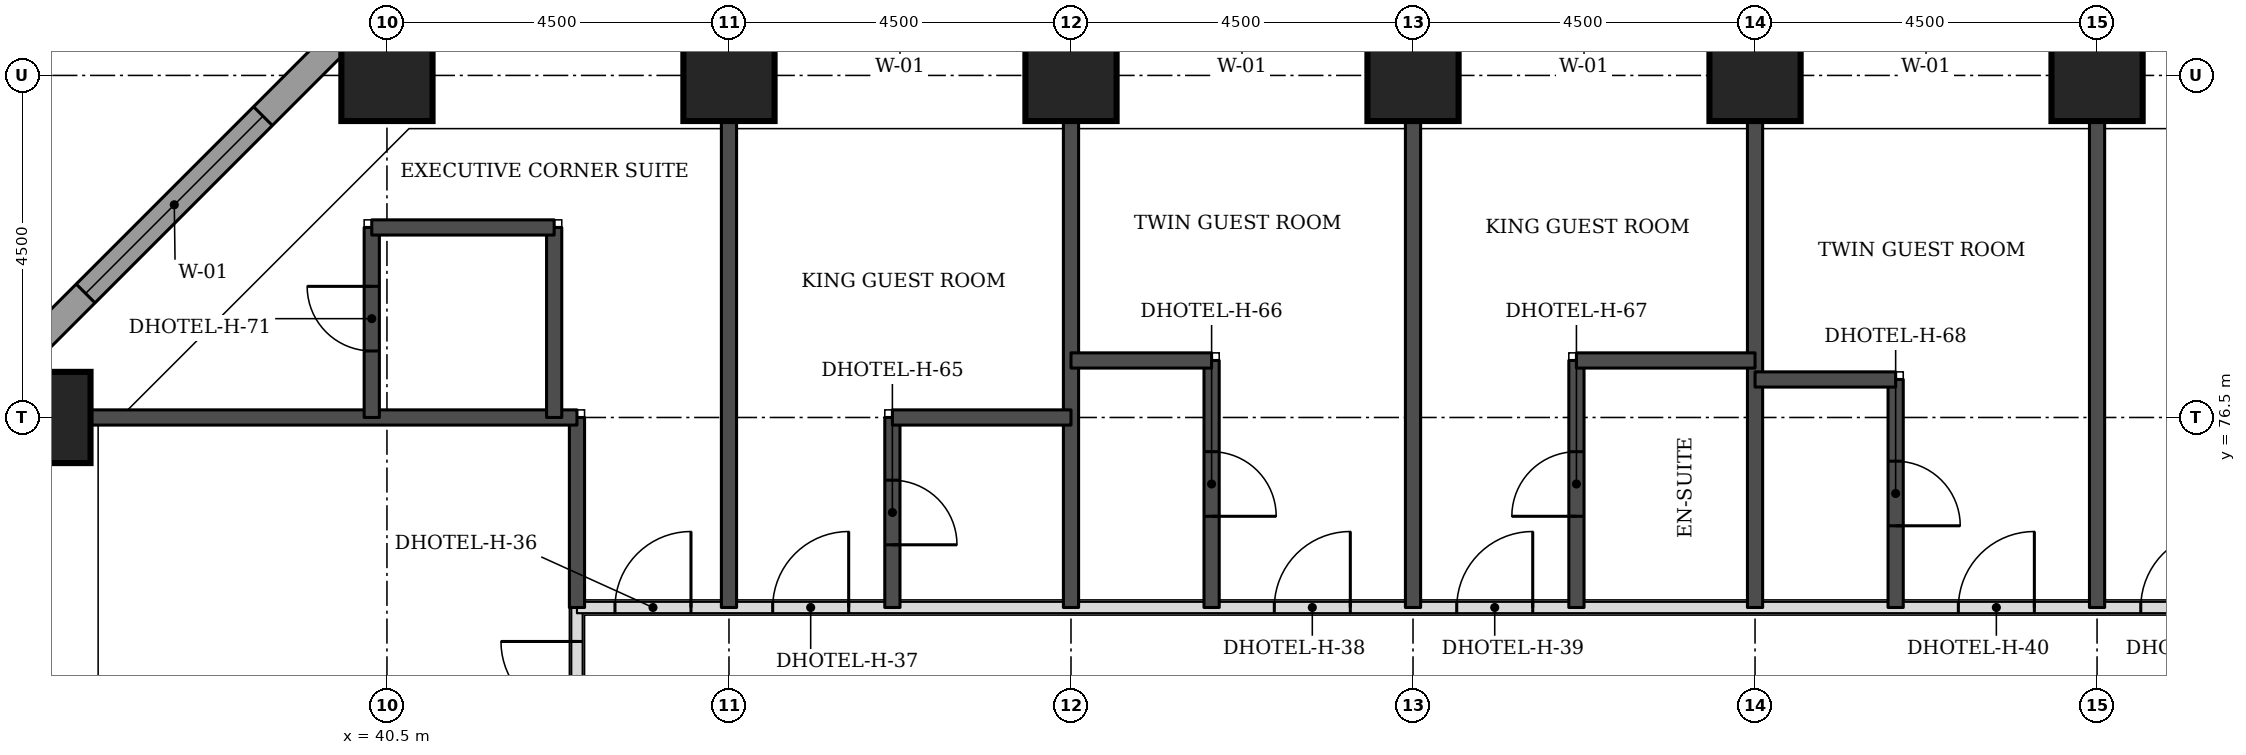
"""IFC4 building model, lengths in metres.
Left out: names, types, materials, properties, quantities, classifications, styles, units other than length and angle.
Written with IfcOpenShell. Run it as: python <this file> out.ifc"""

import sys

from ifc_helpers import new_model, si_unit, direction, frame, frame_2d, origin, origin_2d, place, context, subcontext, project, spatial, rectangle, extrude, element, fill, save


model = new_model("IFC4")
c1 = context("Model", 3, precision=1e-05, world=origin(), true_north=direction((0.0, 1.0)))
c2 = subcontext(c1, "Body", "Model", "MODEL_VIEW")
j1 = project(units=[si_unit("LENGTHUNIT", "METRE"), si_unit("PLANEANGLEUNIT", "RADIAN")], contexts=[c1])
p1 = place(None, origin())
s1 = spatial("IfcSite", under=j1, at=p1, CompositionType="ELEMENT")
p2 = place(p1, origin())
s2 = spatial("IfcBuilding", under=s1, at=p2, CompositionType="ELEMENT")
p3 = place(p2, frame((0.0, 0.0, 46.2)))
s3 = spatial("IfcBuildingStorey", under=s2, at=p3, CompositionType="ELEMENT", Elevation=46.2)
for number, where, z_axis, x_axis in (
    (1, (36.0, 76.5, 0.0), (0.0, 0.0, 1.0), (1.0, 0.0, 0.0)),
    (2, (40.5, 81.0, 0.0), (0.0, 0.0, 1.0), (1.0, 0.0, 0.0)),
    (3, (45.0, 81.0, 0.0), (0.0, 0.0, 1.0), (1.0, 0.0, 0.0)),
    (4, (49.5, 81.0, 0.0), (0.0, 0.0, 1.0), (1.0, 0.0, 0.0)),
    (5, (54.0, 81.0, 0.0), (0.0, 0.0, 1.0), (1.0, 0.0, 0.0)),
    (6, (58.5, 81.0, 0.0), (0.0, 0.0, 1.0), (1.0, 0.0, 0.0)),
    (7, (63.0, 81.0, 0.0), (0.0, 0.0, 1.0), (1.0, 0.0, 0.0)),
):
    element("IfcColumn", number, at=place(p3, frame(where, z_axis=z_axis, x_axis=x_axis)), inside=s3, PredefinedType="COLUMN", context=c2, shape_type="SweptSolid", body=[
        extrude(rectangle(XDim=1.2, YDim=1.2, at=origin_2d()), origin(), (0.0, 0.0, 1.0), 3.3),
    ])
p4 = place(p3, frame((40.23, 81.826, 0.0), z_axis=(0.0, 0.0, 1.0), x_axis=(-0.707106781187, -0.707106781187, 0.0)))
e8 = element("IfcWall", 8, at=p4, inside=s3, PredefinedType="STANDARD", context=c2, shape_type="SweptSolid", body=[
    extrude(rectangle(XDim=7.151, YDim=0.35, at=frame_2d((3.576, 0.0))), origin(), (0.0, 0.0, 1.0), 3.055),
])
p5 = place(p4, frame((1.926, 0.0, 0.8)))
e9 = element("IfcOpeningElement", 9, at=p5, cuts=e8, PredefinedType="OPENING", context=c2, shape_type="SweptSolid", body=[
    extrude(rectangle(XDim=3.3, YDim=1.5, at=frame_2d((1.65, 0.75))), frame((0.0, 0.185, 0.0), z_axis=(0.0, -1.0, 0.0), x_axis=(1.0, 0.0, 0.0)), (0.0, 0.0, 1.0), 0.37),
])
p6 = place(p3, frame((43.0, 56.0, 0.0), z_axis=(0.0, 0.0, 1.0), x_axis=(0.0, 1.0, 0.0)))
e10 = element("IfcWall", 10, at=p6, inside=s3, PredefinedType="PARTITIONING", context=c2, shape_type="SweptSolid", body=[
    extrude(rectangle(XDim=18.0, YDim=0.15, at=frame_2d((9.0, 0.0))), origin(), (0.0, 0.0, 1.0), 3.08),
])
p7 = place(p6, frame((7.575, 0.0, 0.0)))
e11 = element("IfcOpeningElement", 11, at=p7, cuts=e10, PredefinedType="OPENING", context=c2, shape_type="SweptSolid", body=[
    extrude(rectangle(XDim=1.0, YDim=2.1, at=frame_2d((0.5, 1.05))), frame((0.0, 0.085, 0.0), z_axis=(0.0, -1.0, 0.0), x_axis=(1.0, 0.0, 0.0)), (0.0, 0.0, 1.0), 0.17),
])
p8 = place(p6, frame((16.553, 0.0, 0.0)))
e12 = element("IfcOpeningElement", 12, at=p8, cuts=e10, PredefinedType="OPENING", context=c2, shape_type="SweptSolid", body=[
    extrude(rectangle(XDim=1.0, YDim=2.1, at=frame_2d((0.5, 1.05))), frame((0.0, 0.085, 0.0), z_axis=(0.0, -1.0, 0.0), x_axis=(1.0, 0.0, 0.0)), (0.0, 0.0, 1.0), 0.17),
])
p9 = place(p6, frame((3.05, 0.0, 0.0)))
e13 = element("IfcOpeningElement", 13, at=p9, cuts=e10, PredefinedType="OPENING", context=c2, shape_type="SweptSolid", body=[
    extrude(rectangle(XDim=0.9, YDim=2.1, at=frame_2d((0.45, 1.05))), frame((0.0, 0.085, 0.0), z_axis=(0.0, -1.0, 0.0), x_axis=(1.0, 0.0, 0.0)), (0.0, 0.0, 1.0), 0.17),
])
p10 = place(p3, frame((43.0, 74.0, 0.0), z_axis=(0.0, 0.0, 1.0), x_axis=(1.0, 0.0, 0.0)))
e14 = element("IfcWall", 14, at=p10, inside=s3, PredefinedType="PARTITIONING", context=c2, shape_type="SweptSolid", body=[
    extrude(rectangle(XDim=26.5, YDim=0.15, at=frame_2d((13.25, 0.0))), origin(), (0.0, 0.0, 1.0), 3.08),
])
p11 = place(p10, frame((2.575, 0.0, 0.0)))
e15 = element("IfcOpeningElement", 15, at=p11, cuts=e14, PredefinedType="OPENING", context=c2, shape_type="SweptSolid", body=[
    extrude(rectangle(XDim=1.0, YDim=2.1, at=frame_2d((0.5, 1.05))), frame((0.0, 0.085, 0.0), z_axis=(0.0, -1.0, 0.0), x_axis=(1.0, 0.0, 0.0)), (0.0, 0.0, 1.0), 0.17),
])
p12 = place(p10, frame((9.175, 0.0, 0.0)))
e16 = element("IfcOpeningElement", 16, at=p12, cuts=e14, PredefinedType="OPENING", context=c2, shape_type="SweptSolid", body=[
    extrude(rectangle(XDim=1.0, YDim=2.1, at=frame_2d((0.5, 1.05))), frame((0.0, 0.085, 0.0), z_axis=(0.0, -1.0, 0.0), x_axis=(1.0, 0.0, 0.0)), (0.0, 0.0, 1.0), 0.17),
])
p13 = place(p10, frame((11.575, 0.0, 0.0)))
e17 = element("IfcOpeningElement", 17, at=p13, cuts=e14, PredefinedType="OPENING", context=c2, shape_type="SweptSolid", body=[
    extrude(rectangle(XDim=1.0, YDim=2.1, at=frame_2d((0.5, 1.05))), frame((0.0, 0.085, 0.0), z_axis=(0.0, -1.0, 0.0), x_axis=(1.0, 0.0, 0.0)), (0.0, 0.0, 1.0), 0.17),
])
p14 = place(p10, frame((18.175, 0.0, 0.0)))
e18 = element("IfcOpeningElement", 18, at=p14, cuts=e14, PredefinedType="OPENING", context=c2, shape_type="SweptSolid", body=[
    extrude(rectangle(XDim=1.0, YDim=2.1, at=frame_2d((0.5, 1.05))), frame((0.0, 0.085, 0.0), z_axis=(0.0, -1.0, 0.0), x_axis=(1.0, 0.0, 0.0)), (0.0, 0.0, 1.0), 0.17),
])
p15 = place(p10, frame((20.575, 0.0, 0.0)))
e19 = element("IfcOpeningElement", 19, at=p15, cuts=e14, PredefinedType="OPENING", context=c2, shape_type="SweptSolid", body=[
    extrude(rectangle(XDim=1.0, YDim=2.1, at=frame_2d((0.5, 1.05))), frame((0.0, 0.085, 0.0), z_axis=(0.0, -1.0, 0.0), x_axis=(1.0, 0.0, 0.0)), (0.0, 0.0, 1.0), 0.17),
])
p16 = place(p10, frame((0.5, 0.0, 0.0)))
e20 = element("IfcOpeningElement", 20, at=p16, cuts=e14, PredefinedType="OPENING", context=c2, shape_type="SweptSolid", body=[
    extrude(rectangle(XDim=1.0, YDim=2.1, at=frame_2d((0.5, 1.05))), frame((0.0, 0.085, 0.0), z_axis=(0.0, -1.0, 0.0), x_axis=(1.0, 0.0, 0.0)), (0.0, 0.0, 1.0), 0.17),
])
p17 = place(p10, frame((25.0, 0.0, 0.0)))
e21 = element("IfcOpeningElement", 21, at=p17, cuts=e14, PredefinedType="OPENING", context=c2, shape_type="SweptSolid", body=[
    extrude(rectangle(XDim=1.0, YDim=2.1, at=frame_2d((0.5, 1.05))), frame((0.0, 0.085, 0.0), z_axis=(0.0, -1.0, 0.0), x_axis=(1.0, 0.0, 0.0)), (0.0, 0.0, 1.0), 0.17),
])
p18 = place(p3, frame((43.0, 74.0, 0.0), z_axis=(0.0, 0.0, 1.0), x_axis=(0.0, 1.0, 0.0)))
e22 = element("IfcWall", 22, at=p18, inside=s3, PredefinedType="SOLIDWALL", context=c2, shape_type="SweptSolid", body=[
    extrude(rectangle(XDim=2.5, YDim=0.2, at=frame_2d((1.25, 0.0))), origin(), (0.0, 0.0, 1.0), 3.08),
])
p19 = place(p3, frame((45.0, 74.0, 0.0), z_axis=(0.0, 0.0, 1.0), x_axis=(0.0, 1.0, 0.0)))
e23 = element("IfcWall", 23, at=p19, inside=s3, PredefinedType="SOLIDWALL", context=c2, shape_type="SweptSolid", body=[
    extrude(rectangle(XDim=6.4, YDim=0.2, at=frame_2d((3.2, 0.0))), origin(), (0.0, 0.0, 1.0), 3.08),
])
p20 = place(p3, frame((47.15, 74.0, 0.0), z_axis=(0.0, 0.0, 1.0), x_axis=(0.0, 1.0, 0.0)))
e24 = element("IfcWall", 24, at=p20, inside=s3, PredefinedType="SOLIDWALL", context=c2, shape_type="SweptSolid", body=[
    extrude(rectangle(XDim=2.5, YDim=0.2, at=frame_2d((1.25, 0.0))), origin(), (0.0, 0.0, 1.0), 3.08),
])
p21 = place(p20, frame((0.825, 0.0, 0.0)))
e25 = element("IfcOpeningElement", 25, at=p21, cuts=e24, PredefinedType="OPENING", context=c2, shape_type="SweptSolid", body=[
    extrude(rectangle(XDim=0.85, YDim=2.1, at=frame_2d((0.425, 1.05))), frame((0.0, 0.11, 0.0), z_axis=(0.0, -1.0, 0.0), x_axis=(1.0, 0.0, 0.0)), (0.0, 0.0, 1.0), 0.22),
])
p22 = place(p3, frame((49.5, 74.0, 0.0), z_axis=(0.0, 0.0, 1.0), x_axis=(0.0, 1.0, 0.0)))
e26 = element("IfcWall", 26, at=p22, inside=s3, PredefinedType="SOLIDWALL", context=c2, shape_type="SweptSolid", body=[
    extrude(rectangle(XDim=6.4, YDim=0.2, at=frame_2d((3.2, 0.0))), origin(), (0.0, 0.0, 1.0), 3.08),
])
p23 = place(p3, frame((51.35, 74.0, 0.0), z_axis=(0.0, 0.0, 1.0), x_axis=(0.0, 1.0, 0.0)))
e27 = element("IfcWall", 27, at=p23, inside=s3, PredefinedType="SOLIDWALL", context=c2, shape_type="SweptSolid", body=[
    extrude(rectangle(XDim=3.25, YDim=0.2, at=frame_2d((1.625, 0.0))), origin(), (0.0, 0.0, 1.0), 3.08),
])
p24 = place(p23, frame((1.2, 0.0, 0.0)))
e28 = element("IfcOpeningElement", 28, at=p24, cuts=e27, PredefinedType="OPENING", context=c2, shape_type="SweptSolid", body=[
    extrude(rectangle(XDim=0.85, YDim=2.1, at=frame_2d((0.425, 1.05))), frame((0.0, 0.11, 0.0), z_axis=(0.0, -1.0, 0.0), x_axis=(1.0, 0.0, 0.0)), (0.0, 0.0, 1.0), 0.22),
])
p25 = place(p3, frame((54.0, 74.0, 0.0), z_axis=(0.0, 0.0, 1.0), x_axis=(0.0, 1.0, 0.0)))
e29 = element("IfcWall", 29, at=p25, inside=s3, PredefinedType="SOLIDWALL", context=c2, shape_type="SweptSolid", body=[
    extrude(rectangle(XDim=6.4, YDim=0.2, at=frame_2d((3.2, 0.0))), origin(), (0.0, 0.0, 1.0), 3.08),
])
p26 = place(p3, frame((56.15, 74.0, 0.0), z_axis=(0.0, 0.0, 1.0), x_axis=(0.0, 1.0, 0.0)))
e30 = element("IfcWall", 30, at=p26, inside=s3, PredefinedType="SOLIDWALL", context=c2, shape_type="SweptSolid", body=[
    extrude(rectangle(XDim=3.25, YDim=0.2, at=frame_2d((1.625, 0.0))), origin(), (0.0, 0.0, 1.0), 3.08),
])
p27 = place(p26, frame((1.2, 0.0, 0.0)))
e31 = element("IfcOpeningElement", 31, at=p27, cuts=e30, PredefinedType="OPENING", context=c2, shape_type="SweptSolid", body=[
    extrude(rectangle(XDim=0.85, YDim=2.1, at=frame_2d((0.425, 1.05))), frame((0.0, 0.11, 0.0), z_axis=(0.0, -1.0, 0.0), x_axis=(1.0, 0.0, 0.0)), (0.0, 0.0, 1.0), 0.22),
])
p28 = place(p3, frame((58.5, 74.0, 0.0), z_axis=(0.0, 0.0, 1.0), x_axis=(0.0, 1.0, 0.0)))
e32 = element("IfcWall", 32, at=p28, inside=s3, PredefinedType="SOLIDWALL", context=c2, shape_type="SweptSolid", body=[
    extrude(rectangle(XDim=6.4, YDim=0.2, at=frame_2d((3.2, 0.0))), origin(), (0.0, 0.0, 1.0), 3.08),
])
p29 = place(p3, frame((60.35, 74.0, 0.0), z_axis=(0.0, 0.0, 1.0), x_axis=(0.0, 1.0, 0.0)))
e33 = element("IfcWall", 33, at=p29, inside=s3, PredefinedType="SOLIDWALL", context=c2, shape_type="SweptSolid", body=[
    extrude(rectangle(XDim=3.0, YDim=0.2, at=frame_2d((1.5, 0.0))), origin(), (0.0, 0.0, 1.0), 3.08),
])
p30 = place(p29, frame((1.075, 0.0, 0.0)))
e34 = element("IfcOpeningElement", 34, at=p30, cuts=e33, PredefinedType="OPENING", context=c2, shape_type="SweptSolid", body=[
    extrude(rectangle(XDim=0.85, YDim=2.1, at=frame_2d((0.425, 1.05))), frame((0.0, 0.11, 0.0), z_axis=(0.0, -1.0, 0.0), x_axis=(1.0, 0.0, 0.0)), (0.0, 0.0, 1.0), 0.22),
])
for number, where, z_axis, x_axis in (
    (35, (63.0, 74.0, 0.0), (0.0, 0.0, 1.0), (0.0, 1.0, 0.0)),
    (36, (36.6, 76.5, 0.0), (0.0, 0.0, 1.0), (1.0, 0.0, 0.0)),
):
    element("IfcWall", number, at=place(p3, frame(where, z_axis=z_axis, x_axis=x_axis)), inside=s3, PredefinedType="SOLIDWALL", context=c2, shape_type="SweptSolid", body=[
        extrude(rectangle(XDim=6.4, YDim=0.2, at=frame_2d((3.2, 0.0))), origin(), (0.0, 0.0, 1.0), 3.08),
    ])
p31 = place(p3, frame((40.3, 76.5, 0.0), z_axis=(0.0, 0.0, 1.0), x_axis=(0.0, 1.0, 0.0)))
e37 = element("IfcWall", 37, at=p31, inside=s3, PredefinedType="SOLIDWALL", context=c2, shape_type="SweptSolid", body=[
    extrude(rectangle(XDim=2.5, YDim=0.2, at=frame_2d((1.25, 0.0))), origin(), (0.0, 0.0, 1.0), 3.08),
])
p32 = place(p31, frame((0.875, 0.0, 0.0)))
e38 = element("IfcOpeningElement", 38, at=p32, cuts=e37, PredefinedType="OPENING", context=c2, shape_type="SweptSolid", body=[
    extrude(rectangle(XDim=0.85, YDim=2.1, at=frame_2d((0.425, 1.05))), frame((0.0, 0.11, 0.0), z_axis=(0.0, -1.0, 0.0), x_axis=(1.0, 0.0, 0.0)), (0.0, 0.0, 1.0), 0.22),
])
p33 = place(p3, frame((42.7, 76.5, 0.0), z_axis=(0.0, 0.0, 1.0), x_axis=(0.0, 1.0, 0.0)))
e39 = element("IfcWall", 39, at=p33, inside=s3, PredefinedType="SOLIDWALL", context=c2, shape_type="SweptSolid", body=[
    extrude(rectangle(XDim=2.5, YDim=0.2, at=frame_2d((1.25, 0.0))), origin(), (0.0, 0.0, 1.0), 3.08),
])
p34 = place(p3, frame((47.15, 76.5, 0.0), z_axis=(0.0, 0.0, 1.0), x_axis=(1.0, 0.0, 0.0)))
e40 = element("IfcWall", 40, at=p34, inside=s3, PredefinedType="SOLIDWALL", context=c2, shape_type="SweptSolid", body=[
    extrude(rectangle(XDim=2.35, YDim=0.2, at=frame_2d((1.175, 0.0))), origin(), (0.0, 0.0, 1.0), 3.08),
])
for number, where, z_axis, x_axis in (
    (41, (58.5, 77.0, 0.0), (0.0, 0.0, 1.0), (1.0, 0.0, 0.0)),
    (42, (49.5, 77.25, 0.0), (0.0, 0.0, 1.0), (1.0, 0.0, 0.0)),
):
    element("IfcWall", number, at=place(p3, frame(where, z_axis=z_axis, x_axis=x_axis)), inside=s3, PredefinedType="SOLIDWALL", context=c2, shape_type="SweptSolid", body=[
        extrude(rectangle(XDim=1.85, YDim=0.2, at=frame_2d((0.925, 0.0))), origin(), (0.0, 0.0, 1.0), 3.08),
    ])
p35 = place(p3, frame((56.15, 77.25, 0.0), z_axis=(0.0, 0.0, 1.0), x_axis=(1.0, 0.0, 0.0)))
e43 = element("IfcWall", 43, at=p35, inside=s3, PredefinedType="SOLIDWALL", context=c2, shape_type="SweptSolid", body=[
    extrude(rectangle(XDim=2.35, YDim=0.2, at=frame_2d((1.175, 0.0))), origin(), (0.0, 0.0, 1.0), 3.08),
])
p36 = place(p3, frame((40.3, 79.0, 0.0), z_axis=(0.0, 0.0, 1.0), x_axis=(1.0, 0.0, 0.0)))
e44 = element("IfcWall", 44, at=p36, inside=s3, PredefinedType="SOLIDWALL", context=c2, shape_type="SweptSolid", body=[
    extrude(rectangle(XDim=2.4, YDim=0.2, at=frame_2d((1.2, 0.0))), origin(), (0.0, 0.0, 1.0), 3.08),
])
p37 = place(p5, origin())
e45 = element("IfcWindow", 45, at=p37, inside=s3, PartitioningType="SINGLE_PANEL", PredefinedType="WINDOW", context=c2, shape_type="SweptSolid", body=[
    extrude(rectangle(XDim=3.3, YDim=1.5, at=frame_2d((1.65, 0.75))), frame((0.0, 0.085, 0.0), z_axis=(0.0, -1.0, 0.0), x_axis=(1.0, 0.0, 0.0)), (0.0, 0.0, 1.0), 0.06),
])
fill(e9, e45)
p38 = place(p8, origin())
e46 = element("IfcDoor", 46, at=p38, inside=s3, OperationType="SINGLE_SWING_RIGHT", PredefinedType="DOOR", context=c2, shape_type="SweptSolid", body=[
    extrude(rectangle(XDim=1.0, YDim=2.1, at=frame_2d((0.5, 1.05))), frame((0.0, 0.025, 0.0), z_axis=(0.0, -1.0, 0.0), x_axis=(1.0, 0.0, 0.0)), (0.0, 0.0, 1.0), 0.05),
])
fill(e12, e46)
p39 = place(p11, origin())
e47 = element("IfcDoor", 47, at=p39, inside=s3, OperationType="SINGLE_SWING_RIGHT", PredefinedType="DOOR", context=c2, shape_type="SweptSolid", body=[
    extrude(rectangle(XDim=1.0, YDim=2.1, at=frame_2d((0.5, 1.05))), frame((0.0, 0.025, 0.0), z_axis=(0.0, -1.0, 0.0), x_axis=(1.0, 0.0, 0.0)), (0.0, 0.0, 1.0), 0.05),
])
fill(e15, e47)
p40 = place(p21, frame((0.85, 0.0, 0.0), z_axis=(0.0, 0.0, 1.0), x_axis=(-1.0, 0.0, 0.0)))
e48 = element("IfcDoor", 48, at=p40, inside=s3, OperationType="SINGLE_SWING_RIGHT", PredefinedType="DOOR", context=c2, shape_type="SweptSolid", body=[
    extrude(rectangle(XDim=0.85, YDim=2.1, at=frame_2d((0.425, 1.05))), frame((0.0, 0.025, 0.0), z_axis=(0.0, -1.0, 0.0), x_axis=(1.0, 0.0, 0.0)), (0.0, 0.0, 1.0), 0.05),
])
fill(e25, e48)
p41 = place(p12, origin())
e49 = element("IfcDoor", 49, at=p41, inside=s3, OperationType="SINGLE_SWING_RIGHT", PredefinedType="DOOR", context=c2, shape_type="SweptSolid", body=[
    extrude(rectangle(XDim=1.0, YDim=2.1, at=frame_2d((0.5, 1.05))), frame((0.0, 0.025, 0.0), z_axis=(0.0, -1.0, 0.0), x_axis=(1.0, 0.0, 0.0)), (0.0, 0.0, 1.0), 0.05),
])
fill(e16, e49)
p42 = place(p24, frame((0.85, 0.0, 0.0), z_axis=(0.0, 0.0, 1.0), x_axis=(-1.0, 0.0, 0.0)))
e50 = element("IfcDoor", 50, at=p42, inside=s3, OperationType="SINGLE_SWING_RIGHT", PredefinedType="DOOR", context=c2, shape_type="SweptSolid", body=[
    extrude(rectangle(XDim=0.85, YDim=2.1, at=frame_2d((0.425, 1.05))), frame((0.0, 0.025, 0.0), z_axis=(0.0, -1.0, 0.0), x_axis=(1.0, 0.0, 0.0)), (0.0, 0.0, 1.0), 0.05),
])
fill(e28, e50)
p43 = place(p13, origin())
e51 = element("IfcDoor", 51, at=p43, inside=s3, OperationType="SINGLE_SWING_RIGHT", PredefinedType="DOOR", context=c2, shape_type="SweptSolid", body=[
    extrude(rectangle(XDim=1.0, YDim=2.1, at=frame_2d((0.5, 1.05))), frame((0.0, 0.025, 0.0), z_axis=(0.0, -1.0, 0.0), x_axis=(1.0, 0.0, 0.0)), (0.0, 0.0, 1.0), 0.05),
])
fill(e17, e51)
p44 = place(p27, origin())
e52 = element("IfcDoor", 52, at=p44, inside=s3, OperationType="SINGLE_SWING_LEFT", PredefinedType="DOOR", context=c2, shape_type="SweptSolid", body=[
    extrude(rectangle(XDim=0.85, YDim=2.1, at=frame_2d((0.425, 1.05))), frame((0.0, 0.025, 0.0), z_axis=(0.0, -1.0, 0.0), x_axis=(1.0, 0.0, 0.0)), (0.0, 0.0, 1.0), 0.05),
])
fill(e31, e52)
p45 = place(p14, origin())
e53 = element("IfcDoor", 53, at=p45, inside=s3, OperationType="SINGLE_SWING_RIGHT", PredefinedType="DOOR", context=c2, shape_type="SweptSolid", body=[
    extrude(rectangle(XDim=1.0, YDim=2.1, at=frame_2d((0.5, 1.05))), frame((0.0, 0.025, 0.0), z_axis=(0.0, -1.0, 0.0), x_axis=(1.0, 0.0, 0.0)), (0.0, 0.0, 1.0), 0.05),
])
fill(e18, e53)
p46 = place(p30, frame((0.85, 0.0, 0.0), z_axis=(0.0, 0.0, 1.0), x_axis=(-1.0, 0.0, 0.0)))
e54 = element("IfcDoor", 54, at=p46, inside=s3, OperationType="SINGLE_SWING_RIGHT", PredefinedType="DOOR", context=c2, shape_type="SweptSolid", body=[
    extrude(rectangle(XDim=0.85, YDim=2.1, at=frame_2d((0.425, 1.05))), frame((0.0, 0.025, 0.0), z_axis=(0.0, -1.0, 0.0), x_axis=(1.0, 0.0, 0.0)), (0.0, 0.0, 1.0), 0.05),
])
fill(e34, e54)
p47 = place(p15, origin())
e55 = element("IfcDoor", 55, at=p47, inside=s3, OperationType="SINGLE_SWING_RIGHT", PredefinedType="DOOR", context=c2, shape_type="SweptSolid", body=[
    extrude(rectangle(XDim=1.0, YDim=2.1, at=frame_2d((0.5, 1.05))), frame((0.0, 0.025, 0.0), z_axis=(0.0, -1.0, 0.0), x_axis=(1.0, 0.0, 0.0)), (0.0, 0.0, 1.0), 0.05),
])
fill(e19, e55)
p48 = place(p16, origin())
e56 = element("IfcDoor", 56, at=p48, inside=s3, OperationType="SINGLE_SWING_RIGHT", PredefinedType="DOOR", context=c2, shape_type="SweptSolid", body=[
    extrude(rectangle(XDim=1.0, YDim=2.1, at=frame_2d((0.5, 1.05))), frame((0.0, 0.025, 0.0), z_axis=(0.0, -1.0, 0.0), x_axis=(1.0, 0.0, 0.0)), (0.0, 0.0, 1.0), 0.05),
])
fill(e20, e56)
p49 = place(p32, origin())
e57 = element("IfcDoor", 57, at=p49, inside=s3, OperationType="SINGLE_SWING_RIGHT", PredefinedType="DOOR", context=c2, shape_type="SweptSolid", body=[
    extrude(rectangle(XDim=0.85, YDim=2.1, at=frame_2d((0.425, 1.05))), frame((0.0, 0.025, 0.0), z_axis=(0.0, -1.0, 0.0), x_axis=(1.0, 0.0, 0.0)), (0.0, 0.0, 1.0), 0.05),
])
fill(e38, e57)
save(model, sys.argv[1])
